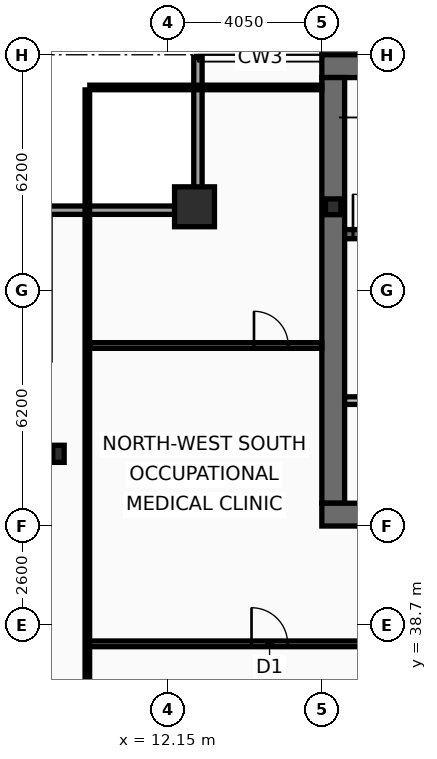
"""IFC4 building model, lengths in metres.
Left out: names, types, materials, properties, quantities, classifications, styles, units other than length and angle.
Written with IfcOpenShell. Run it as: python <this file> out.ifc"""

import sys

from ifc_helpers import new_model, si_unit, direction, frame, frame_2d, origin, origin_2d, place, context, subcontext, project, spatial, rectangle, hollow_rectangle, i_section, extrude, element, fill, save


model = new_model("IFC4")
c1 = context("Model", 3, precision=1e-05, world=origin(), true_north=direction((0.0, 1.0)))
c2 = subcontext(c1, "Body", "Model", "MODEL_VIEW")
j1 = project(units=[si_unit("LENGTHUNIT", "METRE"), si_unit("PLANEANGLEUNIT", "RADIAN")], contexts=[c1])
p1 = place(None, origin())
s1 = spatial("IfcSite", under=j1, at=p1, CompositionType="ELEMENT")
p2 = place(p1, origin())
s2 = spatial("IfcBuilding", under=s1, at=p2, CompositionType="ELEMENT")
p3 = place(p2, frame((0.0, 0.0, 261.8)))
s3 = spatial("IfcBuildingStorey", under=s2, at=p3, CompositionType="ELEMENT", Elevation=261.8)
p4 = place(p3, frame((16.2, 53.4, 0.0), z_axis=(0.0, 0.0, 1.0), x_axis=(1.0, 0.0, 0.0)))
e1 = element("IfcWall", 1, at=p4, inside=s3, PredefinedType="SHEAR", context=c2, shape_type="SweptSolid", body=[
    extrude(rectangle(XDim=40.5, YDim=0.6, at=frame_2d((20.25, 0.0))), origin(), (0.0, 0.0, 1.0), 3.4),
])
p5 = place(p3, frame((16.5, 41.9, 0.0), z_axis=(0.0, 0.0, 1.0), x_axis=(0.0, 1.0, 0.0)))
e2 = element("IfcWall", 2, at=p5, inside=s3, PredefinedType="SHEAR", context=c2, shape_type="SweptSolid", body=[
    extrude(rectangle(XDim=11.2, YDim=0.6, at=frame_2d((5.6, 0.0))), origin(), (0.0, 0.0, 1.0), 3.4),
])
p6 = place(p3, frame((18.65, 41.6, 0.0), z_axis=(0.0, 0.0, 1.0), x_axis=(-1.0, 0.0, 0.0)))
e3 = element("IfcWall", 3, at=p6, inside=s3, PredefinedType="SHEAR", context=c2, shape_type="SweptSolid", body=[
    extrude(rectangle(XDim=2.45, YDim=0.6, at=frame_2d((1.225, 0.0))), origin(), (0.0, 0.0, 1.0), 3.4),
])
p7 = place(p3, frame((16.8, 48.98, 0.0), z_axis=(0.0, 0.0, 1.0), x_axis=(1.0, 0.0, 0.0)))
e4 = element("IfcWall", 4, at=p7, inside=s3, PredefinedType="SHEAR", context=c2, shape_type="SweptSolid", body=[
    extrude(rectangle(XDim=7.42, YDim=0.24, at=frame_2d((3.71, 0.0))), origin(), (0.0, 0.0, 1.0), 3.4),
])
p8 = place(p7, frame((0.22, 0.0, 0.0)))
e5 = element("IfcOpeningElement", 5, at=p8, cuts=e4, PredefinedType="OPENING", context=c2, shape_type="SweptSolid", body=[
    extrude(rectangle(XDim=1.05, YDim=2.15, at=frame_2d((0.525, 1.075))), frame((0.0, 0.13, 0.0), z_axis=(0.0, -1.0, 0.0), x_axis=(1.0, 0.0, 0.0)), (0.0, 0.0, 1.0), 0.26),
])
p9 = place(p3, frame((12.85, 49.7, 0.0), z_axis=(0.0, 0.0, 1.0), x_axis=(1.0, 0.0, 0.0)))
e6 = element("IfcColumn", 6, at=p9, inside=s3, PredefinedType="COLUMN", context=c2, shape_type="SweptSolid", body=[
    extrude(hollow_rectangle(XDim=1.05, YDim=1.05, WallThickness=0.055, at=origin_2d()), origin(), (0.0, 0.0, 1.0), 3.6),
])
p10 = place(p3, frame((9.27, 43.2, 0.0), z_axis=(0.0, 0.0, 1.0), x_axis=(1.0, 0.0, 0.0)))
e7 = element("IfcColumn", 7, at=p10, inside=s3, PredefinedType="COLUMN", context=c2, shape_type="SweptSolid", body=[
    extrude(i_section(OverallWidth=0.3, OverallDepth=0.45, WebThickness=0.014, FlangeThickness=0.026, at=origin_2d()), origin(), (0.0, 0.0, 1.0), 3.6),
])
p11 = place(p3, frame((16.5, 49.7, 0.0), z_axis=(0.0, 0.0, 1.0), x_axis=(1.0, 0.0, 0.0)))
e8 = element("IfcColumn", 8, at=p11, inside=s3, PredefinedType="COLUMN", context=c2, shape_type="SweptSolid", body=[
    extrude(i_section(OverallWidth=0.406, OverallDepth=0.416, WebThickness=0.03, FlangeThickness=0.048, at=origin_2d()), origin(), (0.0, 0.0, 1.0), 3.6),
])
p12 = place(p3, frame((8.83, 49.61, 0.0), z_axis=(0.0, 0.0, 1.0), x_axis=(1.0, 0.0, 0.0)))
e9 = element("IfcWall", 9, at=p12, inside=s3, PredefinedType="SOLIDWALL", context=c2, shape_type="SweptSolid", body=[
    extrude(rectangle(XDim=4.22, YDim=0.22, at=frame_2d((2.11, 0.0))), origin(), (0.0, 0.0, 1.0), 2.79),
])
p13 = place(p3, frame((12.94, 49.72, 0.0), z_axis=(0.0, 0.0, 1.0), x_axis=(0.0, 1.0, 0.0)))
e10 = element("IfcWall", 10, at=p13, inside=s3, PredefinedType="SOLIDWALL", context=c2, shape_type="SweptSolid", body=[
    extrude(rectangle(XDim=3.91, YDim=0.22, at=frame_2d((1.955, 0.0))), origin(), (0.0, 0.0, 1.0), 2.79),
])
p14 = place(p3, frame((16.8, 44.6, 0.0), z_axis=(0.0, 0.0, 1.0), x_axis=(1.0, 0.0, 0.0)))
e11 = element("IfcWall", 11, at=p14, inside=s3, PredefinedType="PARTITIONING", context=c2, shape_type="SweptSolid", body=[
    extrude(rectangle(XDim=4.2, YDim=0.2, at=frame_2d((2.1, 0.0))), origin(), (0.0, 0.0, 1.0), 3.4),
])
p15 = place(p14, frame((1.25, 0.0, 0.0)))
e12 = element("IfcOpeningElement", 12, at=p15, cuts=e11, PredefinedType="OPENING", context=c2, shape_type="SweptSolid", body=[
    extrude(rectangle(XDim=1.05, YDim=2.15, at=frame_2d((0.525, 1.075))), frame((0.0, 0.11, 0.0), z_axis=(0.0, -1.0, 0.0), x_axis=(1.0, 0.0, 0.0)), (0.0, 0.0, 1.0), 0.22),
])
p16 = place(p3, frame((10.03, 38.2, 0.0), z_axis=(0.0, 0.0, 1.0), x_axis=(1.0, 0.0, 0.0)))
e13 = element("IfcWall", 13, at=p16, inside=s3, PredefinedType="PARTITIONING", context=c2, shape_type="SweptSolid", body=[
    extrude(rectangle(XDim=8.52, YDim=0.15, at=frame_2d((4.26, 0.0))), origin(), (0.0, 0.0, 1.0), 2.74),
])
p17 = place(p16, frame((4.32, 0.0, 0.0)))
e14 = element("IfcOpeningElement", 14, at=p17, cuts=e13, PredefinedType="OPENING", context=c2, shape_type="SweptSolid", body=[
    extrude(rectangle(XDim=0.95, YDim=2.05, at=frame_2d((0.475, 1.025))), frame((0.0, 0.085, 0.0), z_axis=(0.0, -1.0, 0.0), x_axis=(1.0, 0.0, 0.0)), (0.0, 0.0, 1.0), 0.17),
])
p18 = place(p3, frame((10.095, 46.05, 0.0), z_axis=(0.0, 0.0, 1.0), x_axis=(1.0, 0.0, 0.0)))
e15 = element("IfcWall", 15, at=p18, inside=s3, PredefinedType="PARTITIONING", context=c2, shape_type="SweptSolid", body=[
    extrude(rectangle(XDim=6.105, YDim=0.15, at=frame_2d((3.052, 0.0))), origin(), (0.0, 0.0, 1.0), 2.79),
])
p19 = place(p18, frame((4.32, 0.0, 0.0)))
e16 = element("IfcOpeningElement", 16, at=p19, cuts=e15, PredefinedType="OPENING", context=c2, shape_type="SweptSolid", body=[
    extrude(rectangle(XDim=0.9, YDim=2.05, at=frame_2d((0.45, 1.025))), frame((0.0, 0.085, 0.0), z_axis=(0.0, -1.0, 0.0), x_axis=(1.0, 0.0, 0.0)), (0.0, 0.0, 1.0), 0.17),
])
p20 = place(p3, frame((10.03, 10.665, 0.0), z_axis=(0.0, 0.0, 1.0), x_axis=(0.0, 1.0, 0.0)))
e17 = element("IfcWall", 17, at=p20, inside=s3, PredefinedType="PARTITIONING", context=c2, shape_type="SweptSolid", body=[
    extrude(rectangle(XDim=42.11, YDim=0.12, at=frame_2d((21.055, 0.0))), origin(), (0.0, 0.0, 1.0), 2.74),
])
p21 = place(p3, frame((10.095, 52.84, 0.0), z_axis=(0.0, 0.0, 1.0), x_axis=(1.0, 0.0, 0.0)))
e18 = element("IfcWall", 18, at=p21, inside=s3, PredefinedType="PARTITIONING", context=c2, shape_type="SweptSolid", body=[
    extrude(rectangle(XDim=6.105, YDim=0.12, at=frame_2d((3.052, 0.0))), origin(), (0.0, 0.0, 1.0), 3.4),
])
p22 = place(p8, origin())
e19 = element("IfcDoor", 19, at=p22, inside=s3, OperationType="SINGLE_SWING_LEFT", PredefinedType="DOOR", context=c2, shape_type="SweptSolid", body=[
    extrude(rectangle(XDim=1.05, YDim=2.15, at=frame_2d((0.525, 1.075))), frame((0.0, 0.025, 0.0), z_axis=(0.0, -1.0, 0.0), x_axis=(1.0, 0.0, 0.0)), (0.0, 0.0, 1.0), 0.05),
])
fill(e5, e19)
p23 = place(p17, origin())
e20 = element("IfcDoor", 20, at=p23, inside=s3, OperationType="SINGLE_SWING_LEFT", PredefinedType="DOOR", context=c2, shape_type="SweptSolid", body=[
    extrude(rectangle(XDim=0.95, YDim=2.05, at=frame_2d((0.475, 1.025))), frame((0.0, 0.025, 0.0), z_axis=(0.0, -1.0, 0.0), x_axis=(1.0, 0.0, 0.0)), (0.0, 0.0, 1.0), 0.05),
])
fill(e14, e20)
p24 = place(p19, origin())
e21 = element("IfcDoor", 21, at=p24, inside=s3, OperationType="SINGLE_SWING_LEFT", PredefinedType="DOOR", context=c2, shape_type="SweptSolid", body=[
    extrude(rectangle(XDim=0.9, YDim=2.05, at=frame_2d((0.45, 1.025))), frame((0.0, 0.025, 0.0), z_axis=(0.0, -1.0, 0.0), x_axis=(1.0, 0.0, 0.0)), (0.0, 0.0, 1.0), 0.05),
])
fill(e16, e21)
save(model, sys.argv[1])
